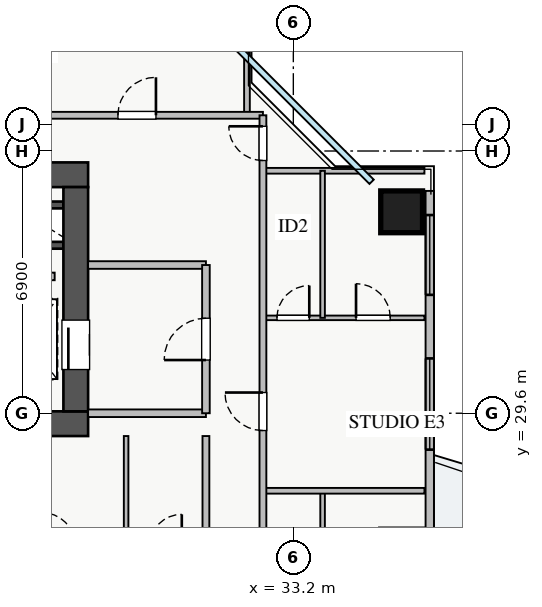
"""IFC4 building model, lengths in metres.
Left out: names, types, materials, properties, quantities, classifications, styles, units other than length and angle.
Written with IfcOpenShell. Run it as: python <this file> out.ifc"""

import sys

from ifc_helpers import new_model, si_unit, direction, frame, frame_2d, origin, origin_2d, place, context, subcontext, project, spatial, rectangle, extrude, source, transform, mapped, element, fill, save


model = new_model("IFC4")
c1 = context("Model", 3, precision=1e-05, world=origin(), true_north=direction((0.0, 1.0)))
c2 = subcontext(c1, "Body", "Model", "MODEL_VIEW")
j1 = project(units=[si_unit("LENGTHUNIT", "METRE"), si_unit("PLANEANGLEUNIT", "RADIAN")], contexts=[c1])
p1 = place(None, origin())
s1 = spatial("IfcSite", under=j1, at=p1, CompositionType="ELEMENT")
p2 = place(p1, origin())
s2 = spatial("IfcBuilding", under=s1, at=p2, CompositionType="ELEMENT")
p3 = place(p2, frame((0.0, 0.0, 103.5)))
s3 = spatial("IfcBuildingStorey", under=s2, at=p3, CompositionType="ELEMENT", Elevation=103.5)
for number, where, z_axis, x_axis in (
    (1, (25.8, 35.08, 0.0), (0.0, 0.0, 1.0), (1.0, 0.0, 0.0)),
    (2, (25.8, 34.02, 0.0), (0.0, 0.0, 1.0), (1.0, 0.0, 0.0)),
):
    element("IfcWall", number, at=place(p3, frame(where, z_axis=z_axis, x_axis=x_axis)), inside=s3, PredefinedType="SHEAR", context=c2, shape_type="SweptSolid", body=[
        extrude(rectangle(XDim=1.35, YDim=0.18, at=frame_2d((0.675, 0.0))), origin(), (0.0, 0.0, 1.0), 3.07),
    ])
p4 = place(p3, frame((10.2, 29.325, 0.0), z_axis=(0.0, 0.0, 1.0), x_axis=(1.0, 0.0, 0.0)))
e3 = element("IfcWall", 3, at=p4, inside=s3, PredefinedType="SHEAR", context=c2, shape_type="SweptSolid", body=[
    extrude(rectangle(XDim=17.6, YDim=0.65, at=frame_2d((8.8, 0.0))), origin(), (0.0, 0.0, 1.0), 3.25),
])
p5 = place(p3, frame((10.2, 35.875, 0.0), z_axis=(0.0, 0.0, 1.0), x_axis=(1.0, 0.0, 0.0)))
e4 = element("IfcWall", 4, at=p5, inside=s3, PredefinedType="SHEAR", context=c2, shape_type="SweptSolid", body=[
    extrude(rectangle(XDim=17.6, YDim=0.65, at=frame_2d((8.8, 0.0))), origin(), (0.0, 0.0, 1.0), 3.25),
])
p6 = place(p5, frame((1.15, 0.0, 0.0)))
e5 = element("IfcOpeningElement", 5, at=p6, cuts=e4, PredefinedType="OPENING", context=c2, shape_type="SweptSolid", body=[
    extrude(rectangle(XDim=1.1, YDim=2.05, at=frame_2d((0.55, 1.025))), frame((0.0, 0.335, 0.0), z_axis=(0.0, -1.0, 0.0), x_axis=(1.0, 0.0, 0.0)), (0.0, 0.0, 1.0), 0.67),
])
p7 = place(p5, frame((8.3, 0.0, 0.0)))
e6 = element("IfcOpeningElement", 6, at=p7, cuts=e4, PredefinedType="OPENING", context=c2, shape_type="SweptSolid", body=[
    extrude(rectangle(XDim=1.1, YDim=2.05, at=frame_2d((0.55, 1.025))), frame((0.0, 0.335, 0.0), z_axis=(0.0, -1.0, 0.0), x_axis=(1.0, 0.0, 0.0)), (0.0, 0.0, 1.0), 0.67),
])
p8 = place(p5, frame((4.9, 0.0, 0.0)))
e7 = element("IfcOpeningElement", 7, at=p8, cuts=e4, PredefinedType="OPENING", context=c2, shape_type="SweptSolid", body=[
    extrude(rectangle(XDim=1.1, YDim=2.05, at=frame_2d((0.55, 1.025))), frame((0.0, 0.335, 0.0), z_axis=(0.0, -1.0, 0.0), x_axis=(1.0, 0.0, 0.0)), (0.0, 0.0, 1.0), 0.67),
])
p9 = place(p5, frame((14.74, 0.0, 0.0)))
e8 = element("IfcOpeningElement", 8, at=p9, cuts=e4, PredefinedType="OPENING", context=c2, shape_type="SweptSolid", body=[
    extrude(rectangle(XDim=1.0, YDim=2.05, at=frame_2d((0.5, 1.025))), frame((0.0, 0.335, 0.0), z_axis=(0.0, -1.0, 0.0), x_axis=(1.0, 0.0, 0.0)), (0.0, 0.0, 1.0), 0.67),
])
p10 = place(p5, frame((10.005, 0.0, 0.0)))
e9 = element("IfcOpeningElement", 9, at=p10, cuts=e4, PredefinedType="OPENING", context=c2, shape_type="SweptSolid", body=[
    extrude(rectangle(XDim=1.0, YDim=2.05, at=frame_2d((0.5, 1.025))), frame((0.0, 0.335, 0.0), z_axis=(0.0, -1.0, 0.0), x_axis=(1.0, 0.0, 0.0)), (0.0, 0.0, 1.0), 0.67),
])
p11 = place(p5, frame((11.55, 0.0, 0.0)))
e10 = element("IfcOpeningElement", 10, at=p11, cuts=e4, PredefinedType="OPENING", context=c2, shape_type="SweptSolid", body=[
    extrude(rectangle(XDim=1.0, YDim=2.05, at=frame_2d((0.5, 1.025))), frame((0.0, 0.335, 0.0), z_axis=(0.0, -1.0, 0.0), x_axis=(1.0, 0.0, 0.0)), (0.0, 0.0, 1.0), 0.67),
])
p12 = place(p5, frame((13.215, 0.0, 0.0)))
e11 = element("IfcOpeningElement", 11, at=p12, cuts=e4, PredefinedType="OPENING", context=c2, shape_type="SweptSolid", body=[
    extrude(rectangle(XDim=1.0, YDim=2.05, at=frame_2d((0.5, 1.025))), frame((0.0, 0.335, 0.0), z_axis=(0.0, -1.0, 0.0), x_axis=(1.0, 0.0, 0.0)), (0.0, 0.0, 1.0), 0.67),
])
p13 = place(p3, frame((27.475, 29.65, 0.0), z_axis=(0.0, 0.0, 1.0), x_axis=(0.0, 1.0, 0.0)))
e12 = element("IfcWall", 12, at=p13, inside=s3, PredefinedType="SHEAR", context=c2, shape_type="SweptSolid", body=[
    extrude(rectangle(XDim=5.9, YDim=0.65, at=frame_2d((2.95, 0.0))), origin(), (0.0, 0.0, 1.0), 3.25),
])
p14 = place(p13, frame((1.1, 0.0, 0.0)))
e13 = element("IfcOpeningElement", 13, at=p14, cuts=e12, PredefinedType="OPENING", context=c2, shape_type="SweptSolid", body=[
    extrude(rectangle(XDim=1.3, YDim=2.05, at=frame_2d((0.65, 1.025))), frame((0.0, 0.335, 0.0), z_axis=(0.0, -1.0, 0.0), x_axis=(1.0, 0.0, 0.0)), (0.0, 0.0, 1.0), 0.67),
])
m1 = source(origin(), c2, "Body", "SweptSolid", [
    extrude(rectangle(XDim=1.1, YDim=1.1, at=origin_2d()), origin(), (0.0, 0.0, 1.0), 3.25),
])
p15 = place(p3, frame((36.05, 34.9, 0.0), z_axis=(0.0, 0.0, 1.0), x_axis=(1.0, 0.0, 0.0)))
e14 = element("IfcColumn", 14, at=p15, inside=s3, PredefinedType="COLUMN", context=c2, shape_type="MappedRepresentation", body=[
    mapped(m1, transform((0.0, 0.0, 0.0), x_axis=(1.0, 0.0, 0.0), y_axis=(0.0, 1.0, 0.0), z_axis=(0.0, 0.0, 1.0), scale=1.0)),
])
p16 = place(p3, frame((36.79, 10.55, 0.0), z_axis=(0.0, 0.0, 1.0), x_axis=(0.0, 1.0, 0.0)))
e15 = element("IfcWall", 15, at=p16, inside=s3, PredefinedType="STANDARD", context=c2, shape_type="SweptSolid", body=[
    extrude(rectangle(XDim=24.9, YDim=0.22, at=frame_2d((12.45, 0.0))), origin(), (0.0, 0.0, 1.0), 2.61),
])
p17 = place(p16, frame((13.3, 0.0, 0.0)))
e16 = element("IfcOpeningElement", 16, at=p17, cuts=e15, PredefinedType="OPENING", context=c2, shape_type="SweptSolid", body=[
    extrude(rectangle(XDim=1.2, YDim=2.1, at=frame_2d((0.6, 1.05))), frame((0.0, 0.12, 0.0), z_axis=(0.0, -1.0, 0.0), x_axis=(1.0, 0.0, 0.0)), (0.0, 0.0, 1.0), 0.24),
])
p18 = place(p16, frame((1.912, 0.0, 0.9)))
e17 = element("IfcOpeningElement", 17, at=p18, cuts=e15, PredefinedType="OPENING", context=c2, shape_type="SweptSolid", body=[
    extrude(rectangle(XDim=2.4, YDim=1.48, at=frame_2d((1.2, 0.74))), frame((0.0, 0.12, 0.0), z_axis=(0.0, -1.0, 0.0), x_axis=(1.0, 0.0, 0.0)), (0.0, 0.0, 1.0), 0.24),
])
p19 = place(p16, frame((22.165, 0.0, 0.9)))
e18 = element("IfcOpeningElement", 18, at=p19, cuts=e15, PredefinedType="OPENING", context=c2, shape_type="SweptSolid", body=[
    extrude(rectangle(XDim=2.1, YDim=1.5, at=frame_2d((1.05, 0.75))), frame((0.0, 0.12, 0.0), z_axis=(0.0, -1.0, 0.0), x_axis=(1.0, 0.0, 0.0)), (0.0, 0.0, 1.0), 0.24),
])
p20 = place(p16, frame((18.093, 0.0, 0.9)))
e19 = element("IfcOpeningElement", 19, at=p20, cuts=e15, PredefinedType="OPENING", context=c2, shape_type="SweptSolid", body=[
    extrude(rectangle(XDim=2.4, YDim=1.5, at=frame_2d((1.2, 0.75))), frame((0.0, 0.12, 0.0), z_axis=(0.0, -1.0, 0.0), x_axis=(1.0, 0.0, 0.0)), (0.0, 0.0, 1.0), 0.24),
])
p21 = place(p16, frame((9.045, 0.0, 0.9)))
e20 = element("IfcOpeningElement", 20, at=p21, cuts=e15, PredefinedType="OPENING", context=c2, shape_type="SweptSolid", body=[
    extrude(rectangle(XDim=0.9, YDim=1.2, at=frame_2d((0.45, 0.6))), frame((0.0, 0.12, 0.0), z_axis=(0.0, -1.0, 0.0), x_axis=(1.0, 0.0, 0.0)), (0.0, 0.0, 1.0), 0.24),
])
for number, where, z_axis, x_axis in (
    (21, (27.8, 29.6, 0.0), (0.0, 0.0, 1.0), (1.0, 0.0, 0.0)),
    (22, (27.8, 33.5, 0.0), (0.0, 0.0, 1.0), (1.0, 0.0, 0.0)),
):
    element("IfcWall", number, at=place(p3, frame(where, z_axis=z_axis, x_axis=x_axis)), inside=s3, PredefinedType="PARTITIONING", context=c2, shape_type="SweptSolid", body=[
        extrude(rectangle(XDim=3.1, YDim=0.2, at=frame_2d((1.55, 0.0))), origin(), (0.0, 0.0, 1.0), 3.07),
    ])
p22 = place(p3, frame((30.9, 29.6, 0.0), z_axis=(0.0, 0.0, 1.0), x_axis=(0.0, 1.0, 0.0)))
e23 = element("IfcWall", 23, at=p22, inside=s3, PredefinedType="PARTITIONING", context=c2, shape_type="SweptSolid", body=[
    extrude(rectangle(XDim=3.9, YDim=0.2, at=frame_2d((1.95, 0.0))), origin(), (0.0, 0.0, 1.0), 3.07),
])
p23 = place(p22, frame((1.4, 0.0, 0.0)))
e24 = element("IfcOpeningElement", 24, at=p23, cuts=e23, PredefinedType="OPENING", context=c2, shape_type="SweptSolid", body=[
    extrude(rectangle(XDim=1.1, YDim=2.05, at=frame_2d((0.55, 1.025))), frame((0.0, 0.11, 0.0), z_axis=(0.0, -1.0, 0.0), x_axis=(1.0, 0.0, 0.0)), (0.0, 0.0, 1.0), 0.22),
])
p24 = place(p3, frame((21.75, 33.2, 0.0), z_axis=(0.0, 0.0, 1.0), x_axis=(1.0, 0.0, 0.0)))
e25 = element("IfcWall", 25, at=p24, inside=s3, PredefinedType="PARTITIONING", context=c2, shape_type="SweptSolid", body=[
    extrude(rectangle(XDim=5.17, YDim=0.2, at=frame_2d((2.585, 0.0))), origin(), (0.0, 0.0, 1.0), 3.07),
])
p25 = place(p3, frame((31.98, 37.44, 0.0), z_axis=(0.0, 0.0, 1.0), x_axis=(0.0, 1.0, 0.0)))
e26 = element("IfcWall", 26, at=p25, inside=s3, PredefinedType="PARTITIONING", context=c2, shape_type="SweptSolid", body=[
    extrude(rectangle(XDim=3.21, YDim=0.15, at=frame_2d((1.605, 0.0))), origin(), (0.0, 0.0, 1.0), 3.07),
])
p26 = place(p3, frame((8.82, 37.44, 0.0), z_axis=(0.0, 0.0, 1.0), x_axis=(1.0, 0.0, 0.0)))
e27 = element("IfcWall", 27, at=p26, inside=s3, PredefinedType="PARTITIONING", context=c2, shape_type="SweptSolid", body=[
    extrude(rectangle(XDim=23.58, YDim=0.18, at=frame_2d((11.79, 0.0))), origin(), (0.0, 0.0, 1.0), 3.07),
])
p27 = place(p26, frame((2.75, 0.0, 0.0)))
e28 = element("IfcOpeningElement", 28, at=p27, cuts=e27, PredefinedType="OPENING", context=c2, shape_type="SweptSolid", body=[
    extrude(rectangle(XDim=1.0, YDim=2.05, at=frame_2d((0.5, 1.025))), frame((0.0, 0.1, 0.0), z_axis=(0.0, -1.0, 0.0), x_axis=(1.0, 0.0, 0.0)), (0.0, 0.0, 1.0), 0.2),
])
p28 = place(p26, frame((7.89, 0.0, 0.0)))
e29 = element("IfcOpeningElement", 29, at=p28, cuts=e27, PredefinedType="OPENING", context=c2, shape_type="SweptSolid", body=[
    extrude(rectangle(XDim=1.0, YDim=2.05, at=frame_2d((0.5, 1.025))), frame((0.0, 0.1, 0.0), z_axis=(0.0, -1.0, 0.0), x_axis=(1.0, 0.0, 0.0)), (0.0, 0.0, 1.0), 0.2),
])
p29 = place(p26, frame((13.325, 0.0, 0.0)))
e30 = element("IfcOpeningElement", 30, at=p29, cuts=e27, PredefinedType="OPENING", context=c2, shape_type="SweptSolid", body=[
    extrude(rectangle(XDim=1.0, YDim=2.05, at=frame_2d((0.5, 1.025))), frame((0.0, 0.1, 0.0), z_axis=(0.0, -1.0, 0.0), x_axis=(1.0, 0.0, 0.0)), (0.0, 0.0, 1.0), 0.2),
])
p30 = place(p26, frame((19.765, 0.0, 0.0)))
e31 = element("IfcOpeningElement", 31, at=p30, cuts=e27, PredefinedType="OPENING", context=c2, shape_type="SweptSolid", body=[
    extrude(rectangle(XDim=1.0, YDim=2.05, at=frame_2d((0.5, 1.025))), frame((0.0, 0.1, 0.0), z_axis=(0.0, -1.0, 0.0), x_axis=(1.0, 0.0, 0.0)), (0.0, 0.0, 1.0), 0.2),
])
p31 = place(p3, frame((32.4, 35.98, 0.0), z_axis=(0.0, 0.0, 1.0), x_axis=(1.0, 0.0, 0.0)))
e32 = element("IfcWall", 32, at=p31, inside=s3, PredefinedType="PARTITIONING", context=c2, shape_type="SweptSolid", body=[
    extrude(rectangle(XDim=4.25, YDim=0.15, at=frame_2d((2.125, 0.0))), origin(), (0.0, 0.0, 1.0), 3.07),
])
p32 = place(p3, frame((33.97, 23.1, 0.0), z_axis=(0.0, 0.0, 1.0), x_axis=(0.0, 1.0, 0.0)))
e33 = element("IfcWall", 33, at=p32, inside=s3, PredefinedType="PLUMBINGWALL", context=c2, shape_type="SweptSolid", body=[
    extrude(rectangle(XDim=4.46, YDim=0.12, at=frame_2d((2.23, 0.0))), origin(), (0.0, 0.0, 1.0), 3.07),
])
p33 = place(p3, frame((32.4, 32.11, 0.0), z_axis=(0.0, 0.0, 1.0), x_axis=(1.0, 0.0, 0.0)))
e34 = element("IfcWall", 34, at=p33, inside=s3, PredefinedType="PLUMBINGWALL", context=c2, shape_type="SweptSolid", body=[
    extrude(rectangle(XDim=4.25, YDim=0.12, at=frame_2d((2.125, 0.0))), origin(), (0.0, 0.0, 1.0), 3.07),
])
p34 = place(p33, frame((0.37, 0.0, 0.0)))
e35 = element("IfcOpeningElement", 35, at=p34, cuts=e34, PredefinedType="OPENING", context=c2, shape_type="SweptSolid", body=[
    extrude(rectangle(XDim=0.85, YDim=2.05, at=frame_2d((0.425, 1.025))), frame((0.0, 0.07, 0.0), z_axis=(0.0, -1.0, 0.0), x_axis=(1.0, 0.0, 0.0)), (0.0, 0.0, 1.0), 0.14),
])
p35 = place(p33, frame((2.45, 0.0, 0.0)))
e36 = element("IfcOpeningElement", 36, at=p35, cuts=e34, PredefinedType="OPENING", context=c2, shape_type="SweptSolid", body=[
    extrude(rectangle(XDim=0.9, YDim=2.05, at=frame_2d((0.45, 1.025))), frame((0.0, 0.07, 0.0), z_axis=(0.0, -1.0, 0.0), x_axis=(1.0, 0.0, 0.0)), (0.0, 0.0, 1.0), 0.14),
])
p36 = place(p3, frame((33.97, 32.11, 0.0), z_axis=(0.0, 0.0, 1.0), x_axis=(0.0, 1.0, 0.0)))
e37 = element("IfcWall", 37, at=p36, inside=s3, PredefinedType="PLUMBINGWALL", context=c2, shape_type="SweptSolid", body=[
    extrude(rectangle(XDim=3.87, YDim=0.12, at=frame_2d((1.935, 0.0))), origin(), (0.0, 0.0, 1.0), 3.07),
])
p37 = place(p3, frame((32.4, 27.56, 0.0), z_axis=(0.0, 0.0, 1.0), x_axis=(1.0, 0.0, 0.0)))
e38 = element("IfcWall", 38, at=p37, inside=s3, PredefinedType="PARTITIONING", context=c2, shape_type="SweptSolid", body=[
    extrude(rectangle(XDim=4.25, YDim=0.15, at=frame_2d((2.125, 0.0))), origin(), (0.0, 0.0, 1.0), 3.07),
])
p38 = place(p3, frame((32.4, 8.31, 0.0), z_axis=(0.0, 0.0, 1.0), x_axis=(0.0, 1.0, 0.0)))
e39 = element("IfcWall", 39, at=p38, inside=s3, PredefinedType="PARTITIONING", context=c2, shape_type="SweptSolid", body=[
    extrude(rectangle(XDim=29.13, YDim=0.18, at=frame_2d((14.565, 0.0))), origin(), (0.0, 0.0, 1.0), 3.07),
])
p39 = place(p38, frame((27.94, 0.0, 0.0)))
e40 = element("IfcOpeningElement", 40, at=p39, cuts=e39, PredefinedType="OPENING", context=c2, shape_type="SweptSolid", body=[
    extrude(rectangle(XDim=0.9, YDim=2.05, at=frame_2d((0.45, 1.025))), frame((0.0, 0.1, 0.0), z_axis=(0.0, -1.0, 0.0), x_axis=(1.0, 0.0, 0.0)), (0.0, 0.0, 1.0), 0.2),
])
p40 = place(p38, frame((0.415, 0.0, 0.0)))
e41 = element("IfcOpeningElement", 41, at=p40, cuts=e39, PredefinedType="OPENING", context=c2, shape_type="SweptSolid", body=[
    extrude(rectangle(XDim=0.9, YDim=2.05, at=frame_2d((0.45, 1.025))), frame((0.0, 0.1, 0.0), z_axis=(0.0, -1.0, 0.0), x_axis=(1.0, 0.0, 0.0)), (0.0, 0.0, 1.0), 0.2),
])
p41 = place(p38, frame((5.88, 0.0, 0.0)))
e42 = element("IfcOpeningElement", 42, at=p41, cuts=e39, PredefinedType="OPENING", context=c2, shape_type="SweptSolid", body=[
    extrude(rectangle(XDim=1.0, YDim=2.05, at=frame_2d((0.5, 1.025))), frame((0.0, 0.1, 0.0), z_axis=(0.0, -1.0, 0.0), x_axis=(1.0, 0.0, 0.0)), (0.0, 0.0, 1.0), 0.2),
])
p42 = place(p38, frame((12.23, 0.0, 0.0)))
e43 = element("IfcOpeningElement", 43, at=p42, cuts=e39, PredefinedType="OPENING", context=c2, shape_type="SweptSolid", body=[
    extrude(rectangle(XDim=1.0, YDim=2.05, at=frame_2d((0.5, 1.025))), frame((0.0, 0.1, 0.0), z_axis=(0.0, -1.0, 0.0), x_axis=(1.0, 0.0, 0.0)), (0.0, 0.0, 1.0), 0.2),
])
p43 = place(p38, frame((20.835, 0.0, 0.0)))
e44 = element("IfcOpeningElement", 44, at=p43, cuts=e39, PredefinedType="OPENING", context=c2, shape_type="SweptSolid", body=[
    extrude(rectangle(XDim=1.0, YDim=2.05, at=frame_2d((0.5, 1.025))), frame((0.0, 0.1, 0.0), z_axis=(0.0, -1.0, 0.0), x_axis=(1.0, 0.0, 0.0)), (0.0, 0.0, 1.0), 0.2),
])
p44 = place(p3, frame((28.8, 26.09, 0.0), z_axis=(0.0, 0.0, 1.0), x_axis=(0.0, 1.0, 0.0)))
e45 = element("IfcWall", 45, at=p44, inside=s3, PredefinedType="PLUMBINGWALL", context=c2, shape_type="SweptSolid", body=[
    extrude(rectangle(XDim=2.91, YDim=0.12, at=frame_2d((1.455, 0.0))), origin(), (0.0, 0.0, 1.0), 3.07),
])
p45 = place(p3, frame((30.9, 17.0, 0.0), z_axis=(0.0, 0.0, 1.0), x_axis=(0.0, 1.0, 0.0)))
e46 = element("IfcWall", 46, at=p45, inside=s3, PredefinedType="PARTITIONING", context=c2, shape_type="SweptSolid", body=[
    extrude(rectangle(XDim=12.0, YDim=0.18, at=frame_2d((6.0, 0.0))), origin(), (0.0, 0.0, 1.0), 3.07),
])
p46 = place(p45, frame((0.84, 0.0, 0.0)))
e47 = element("IfcOpeningElement", 47, at=p46, cuts=e46, PredefinedType="OPENING", context=c2, shape_type="SweptSolid", body=[
    extrude(rectangle(XDim=1.0, YDim=2.05, at=frame_2d((0.5, 1.025))), frame((0.0, 0.1, 0.0), z_axis=(0.0, -1.0, 0.0), x_axis=(1.0, 0.0, 0.0)), (0.0, 0.0, 1.0), 0.2),
])
p47 = place(p45, frame((6.69, 0.0, 0.0)))
e48 = element("IfcOpeningElement", 48, at=p47, cuts=e46, PredefinedType="OPENING", context=c2, shape_type="SweptSolid", body=[
    extrude(rectangle(XDim=1.0, YDim=2.05, at=frame_2d((0.5, 1.025))), frame((0.0, 0.1, 0.0), z_axis=(0.0, -1.0, 0.0), x_axis=(1.0, 0.0, 0.0)), (0.0, 0.0, 1.0), 0.2),
])
m2 = source(origin(), c2, "Body", "SweptSolid", [
    extrude(rectangle(XDim=2.1, YDim=1.5, at=frame_2d((1.05, 0.75))), frame((0.0, 0.03, 0.0), z_axis=(0.0, -1.0, 0.0), x_axis=(1.0, 0.0, 0.0)), (0.0, 0.0, 1.0), 0.06),
])
p48 = place(p19, origin())
e49 = element("IfcWindow", 49, at=p48, inside=s3, PartitioningType="TRIPLE_PANEL_VERTICAL", PredefinedType="WINDOW", context=c2, shape_type="MappedRepresentation", body=[
    mapped(m2, transform((0.0, 0.0, 0.0), x_axis=(1.0, 0.0, 0.0), y_axis=(0.0, 1.0, 0.0), z_axis=(0.0, 0.0, 1.0), scale=1.0)),
])
fill(e18, e49)
m3 = source(origin(), c2, "Body", "SweptSolid", [
    extrude(rectangle(XDim=1.3, YDim=2.05, at=frame_2d((0.65, 1.025))), frame((0.0, 0.025, 0.0), z_axis=(0.0, -1.0, 0.0), x_axis=(1.0, 0.0, 0.0)), (0.0, 0.0, 1.0), 0.05),
])
p49 = place(p14, origin())
e50 = element("IfcDoor", 50, at=p49, inside=s3, OperationType="SLIDING_TO_LEFT", PredefinedType="DOOR", context=c2, shape_type="MappedRepresentation", body=[
    mapped(m3, transform((0.0, 0.0, 0.0), x_axis=(1.0, 0.0, 0.0), y_axis=(0.0, 1.0, 0.0), z_axis=(0.0, 0.0, 1.0), scale=1.0)),
])
fill(e13, e50)
m4 = source(origin(), c2, "Body", "SweptSolid", [
    extrude(rectangle(XDim=1.1, YDim=2.05, at=frame_2d((0.55, 1.025))), frame((0.0, 0.025, 0.0), z_axis=(0.0, -1.0, 0.0), x_axis=(1.0, 0.0, 0.0)), (0.0, 0.0, 1.0), 0.05),
])
p50 = place(p23, origin())
e51 = element("IfcDoor", 51, at=p50, inside=s3, OperationType="SINGLE_SWING_LEFT", PredefinedType="DOOR", context=c2, shape_type="MappedRepresentation", body=[
    mapped(m4, transform((0.0, 0.0, 0.0), x_axis=(1.0, 0.0, 0.0), y_axis=(0.0, 1.0, 0.0), z_axis=(0.0, 0.0, 1.0), scale=1.0)),
])
fill(e24, e51)
m5 = source(origin(), c2, "Body", "SweptSolid", [
    extrude(rectangle(XDim=1.0, YDim=2.05, at=frame_2d((0.5, 1.025))), frame((0.0, 0.025, 0.0), z_axis=(0.0, -1.0, 0.0), x_axis=(1.0, 0.0, 0.0)), (0.0, 0.0, 1.0), 0.05),
])
p51 = place(p30, origin())
e52 = element("IfcDoor", 52, at=p51, inside=s3, OperationType="SINGLE_SWING_RIGHT", PredefinedType="DOOR", context=c2, shape_type="MappedRepresentation", body=[
    mapped(m5, transform((0.0, 0.0, 0.0), x_axis=(1.0, 0.0, 0.0), y_axis=(0.0, 1.0, 0.0), z_axis=(0.0, 0.0, 1.0), scale=1.0)),
])
fill(e31, e52)
m6 = source(origin(), c2, "Body", "SweptSolid", [
    extrude(rectangle(XDim=0.85, YDim=2.05, at=frame_2d((0.425, 1.025))), frame((0.0, 0.025, 0.0), z_axis=(0.0, -1.0, 0.0), x_axis=(1.0, 0.0, 0.0)), (0.0, 0.0, 1.0), 0.05),
])
p52 = place(p34, origin())
e53 = element("IfcDoor", 53, at=p52, inside=s3, OperationType="SINGLE_SWING_RIGHT", PredefinedType="DOOR", context=c2, shape_type="MappedRepresentation", body=[
    mapped(m6, transform((0.0, 0.0, 0.0), x_axis=(1.0, 0.0, 0.0), y_axis=(0.0, 1.0, 0.0), z_axis=(0.0, 0.0, 1.0), scale=1.0)),
])
fill(e35, e53)
m7 = source(origin(), c2, "Body", "SweptSolid", [
    extrude(rectangle(XDim=0.9, YDim=2.05, at=frame_2d((0.45, 1.025))), frame((0.0, 0.025, 0.0), z_axis=(0.0, -1.0, 0.0), x_axis=(1.0, 0.0, 0.0)), (0.0, 0.0, 1.0), 0.05),
])
p53 = place(p35, origin())
e54 = element("IfcDoor", 54, at=p53, inside=s3, OperationType="SINGLE_SWING_LEFT", PredefinedType="DOOR", context=c2, shape_type="MappedRepresentation", body=[
    mapped(m7, transform((0.0, 0.0, 0.0), x_axis=(1.0, 0.0, 0.0), y_axis=(0.0, 1.0, 0.0), z_axis=(0.0, 0.0, 1.0), scale=1.0)),
])
fill(e36, e54)
p54 = place(p39, origin())
e55 = element("IfcDoor", 55, at=p54, inside=s3, OperationType="SINGLE_SWING_RIGHT", PredefinedType="DOOR", context=c2, shape_type="MappedRepresentation", body=[
    mapped(m7, transform((0.0, 0.0, 0.0), x_axis=(1.0, 0.0, 0.0), y_axis=(0.0, 1.0, 0.0), z_axis=(0.0, 0.0, 1.0), scale=1.0)),
])
fill(e40, e55)
p55 = place(p43, origin())
e56 = element("IfcDoor", 56, at=p55, inside=s3, OperationType="SINGLE_SWING_RIGHT", PredefinedType="DOOR", context=c2, shape_type="MappedRepresentation", body=[
    mapped(m5, transform((0.0, 0.0, 0.0), x_axis=(1.0, 0.0, 0.0), y_axis=(0.0, 1.0, 0.0), z_axis=(0.0, 0.0, 1.0), scale=1.0)),
])
fill(e44, e56)
m8 = source(origin(), c2, "Body", "SweptSolid", [
    extrude(rectangle(XDim=2.4, YDim=1.5, at=frame_2d((1.2, 0.75))), frame((0.0, 0.03, 0.0), z_axis=(0.0, -1.0, 0.0), x_axis=(1.0, 0.0, 0.0)), (0.0, 0.0, 1.0), 0.06),
])
p56 = place(p20, origin())
e57 = element("IfcWindow", 57, at=p56, inside=s3, PartitioningType="TRIPLE_PANEL_VERTICAL", PredefinedType="WINDOW", context=c2, shape_type="MappedRepresentation", body=[
    mapped(m8, transform((0.0, 0.0, 0.0), x_axis=(1.0, 0.0, 0.0), y_axis=(0.0, 1.0, 0.0), z_axis=(0.0, 0.0, 1.0), scale=1.0)),
])
fill(e19, e57)
save(model, sys.argv[1])
